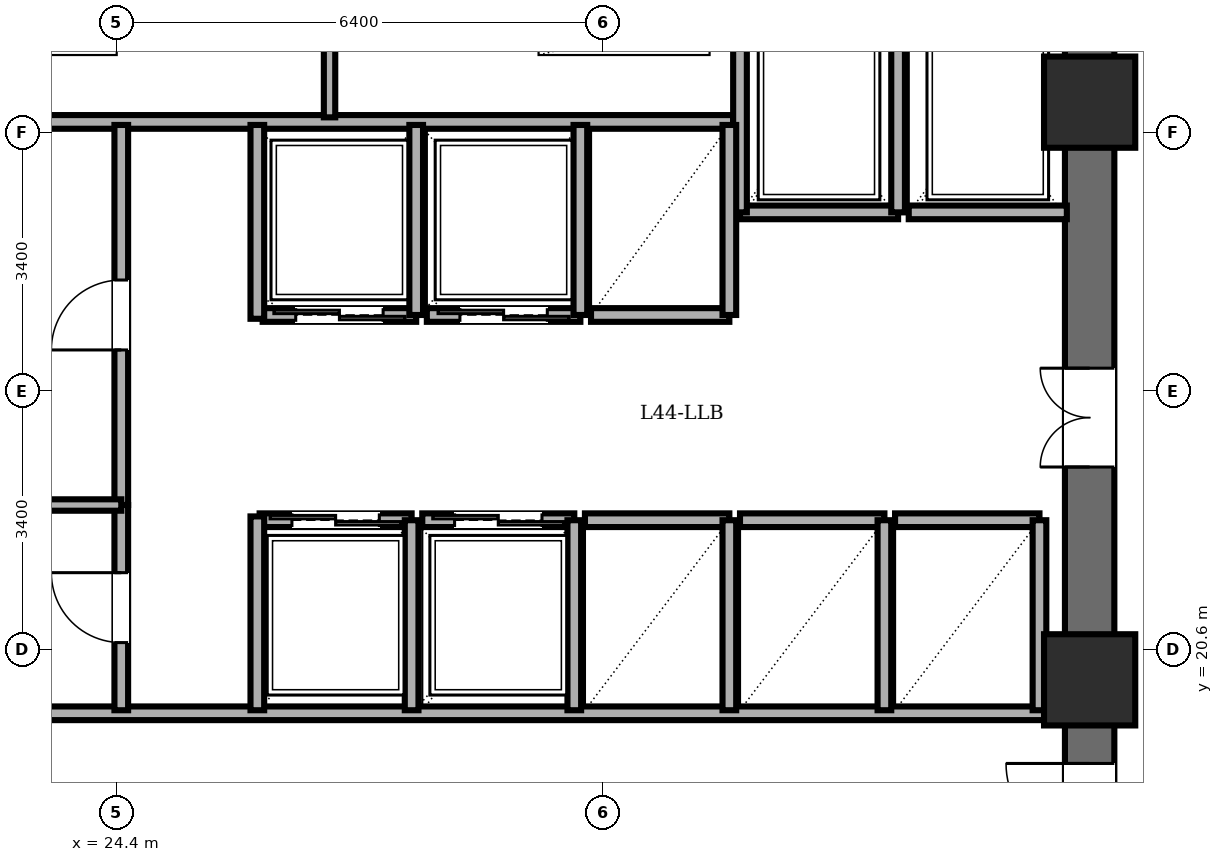
"""IFC4 building model, lengths in metres.
Left out: names, types, materials, properties, quantities, classifications, styles, units other than length and angle.
Written with IfcOpenShell. Run it as: python <this file> out.ifc"""

import sys

from ifc_helpers import new_model, si_unit, direction, frame, frame_2d, origin, origin_2d, place, context, subcontext, project, spatial, rectangle, extrude, element, fill, save


model = new_model("IFC4")
c1 = context("Model", 3, precision=1e-05, world=origin(), true_north=direction((0.0, 1.0)))
c2 = subcontext(c1, "Body", "Model", "MODEL_VIEW")
j1 = project(units=[si_unit("LENGTHUNIT", "METRE"), si_unit("PLANEANGLEUNIT", "RADIAN")], contexts=[c1])
p1 = place(None, origin())
s1 = spatial("IfcSite", under=j1, at=p1, CompositionType="ELEMENT")
p2 = place(p1, origin())
s2 = spatial("IfcBuilding", under=s1, at=p2, CompositionType="ELEMENT")
p3 = place(p2, frame((0.0, 0.0, 169.0)))
s3 = spatial("IfcBuildingStorey", under=s2, at=p3, CompositionType="ELEMENT", Elevation=169.0)
for number, where, z_axis, x_axis in (
    (1, (37.2, 20.2, 0.0), (0.0, 0.0, 1.0), (1.0, 0.0, 0.0)),
    (2, (37.2, 27.8, 0.0), (0.0, 0.0, 1.0), (1.0, 0.0, 0.0)),
):
    element("IfcColumn", number, at=place(p3, frame(where, z_axis=z_axis, x_axis=x_axis)), inside=s3, PredefinedType="COLUMN", context=c2, shape_type="SweptSolid", body=[
        extrude(rectangle(XDim=1.2, YDim=1.2, at=origin_2d()), origin(), (0.0, 0.0, 1.0), 3.6),
    ])
p4 = place(p3, frame((37.2, 14.4, 0.0), z_axis=(0.0, 0.0, 1.0), x_axis=(0.0, 1.0, 0.0)))
e3 = element("IfcWall", 3, at=p4, inside=s3, PredefinedType="SHEAR", context=c2, shape_type="SweptSolid", body=[
    extrude(rectangle(XDim=19.2, YDim=0.65, at=frame_2d((9.6, 0.0))), origin(), (0.0, 0.0, 1.0), 3.4),
])
p5 = place(p4, frame((15.8, 0.0, 0.0)))
e4 = element("IfcOpeningElement", 4, at=p5, cuts=e3, PredefinedType="OPENING", context=c2, shape_type="SweptSolid", body=[
    extrude(rectangle(XDim=1.15, YDim=2.15, at=frame_2d((0.575, 1.075))), frame((0.0, 0.335, 0.0), z_axis=(0.0, -1.0, 0.0), x_axis=(1.0, 0.0, 0.0)), (0.0, 0.0, 1.0), 0.67),
])
p6 = place(p4, frame((3.6, 0.0, 0.0)))
e5 = element("IfcOpeningElement", 5, at=p6, cuts=e3, PredefinedType="OPENING", context=c2, shape_type="SweptSolid", body=[
    extrude(rectangle(XDim=1.1, YDim=2.15, at=frame_2d((0.55, 1.075))), frame((0.0, 0.335, 0.0), z_axis=(0.0, -1.0, 0.0), x_axis=(1.0, 0.0, 0.0)), (0.0, 0.0, 1.0), 0.67),
])
p7 = place(p4, frame((8.6, 0.0, 0.0)))
e6 = element("IfcOpeningElement", 6, at=p7, cuts=e3, PredefinedType="OPENING", context=c2, shape_type="SweptSolid", body=[
    extrude(rectangle(XDim=1.3, YDim=2.2, at=frame_2d((0.65, 1.1))), frame((0.0, 0.335, 0.0), z_axis=(0.0, -1.0, 0.0), x_axis=(1.0, 0.0, 0.0)), (0.0, 0.0, 1.0), 0.67),
])
p8 = place(p3, frame((21.95, 27.54, 0.0), z_axis=(0.0, 0.0, 1.0), x_axis=(1.0, 0.0, 0.0)))
e7 = element("IfcWall", 7, at=p8, inside=s3, PredefinedType="PARTITIONING", context=c2, shape_type="SweptSolid", body=[
    extrude(rectangle(XDim=10.56, YDim=0.18, at=frame_2d((5.28, 0.0))), origin(), (0.0, 0.0, 1.0), 3.4),
])
p9 = place(p3, frame((27.2, 27.6, 0.0), z_axis=(0.0, 0.0, 1.0), x_axis=(0.0, 1.0, 0.0)))
e8 = element("IfcWall", 8, at=p9, inside=s3, PredefinedType="PARTITIONING", context=c2, shape_type="SweptSolid", body=[
    extrude(rectangle(XDim=1.52, YDim=0.15, at=frame_2d((0.76, 0.0))), origin(), (0.0, 0.0, 1.0), 3.4),
])
p10 = place(p3, frame((21.95, 19.76, 0.0), z_axis=(0.0, 0.0, 1.0), x_axis=(1.0, 0.0, 0.0)))
e9 = element("IfcWall", 9, at=p10, inside=s3, PredefinedType="PARTITIONING", context=c2, shape_type="SweptSolid", body=[
    extrude(rectangle(XDim=14.87, YDim=0.18, at=frame_2d((7.435, 0.0))), origin(), (0.0, 0.0, 1.0), 3.4),
])
p11 = place(p3, frame((34.68, 26.35, 0.0), z_axis=(0.0, 0.0, 1.0), x_axis=(-1.0, 0.0, 0.0)))
e10 = element("IfcWall", 10, at=p11, inside=s3, PredefinedType="PARTITIONING", context=c2, shape_type="SweptSolid", body=[
    extrude(rectangle(XDim=2.08, YDim=0.18, at=frame_2d((1.04, 0.0))), origin(), (0.0, 0.0, 1.0), 3.4),
])
for number, where, z_axis, x_axis in (
    (11, (34.68, 26.35, 0.0), (0.0, 0.0, 1.0), (0.0, 1.0, 0.0)),
    (12, (32.6, 29.08, 0.0), (0.0, 0.0, 1.0), (0.0, -1.0, 0.0)),
):
    element("IfcWall", number, at=place(p3, frame(where, z_axis=z_axis, x_axis=x_axis)), inside=s3, PredefinedType="PARTITIONING", context=c2, shape_type="SweptSolid", body=[
        extrude(rectangle(XDim=2.73, YDim=0.18, at=frame_2d((1.365, 0.0))), origin(), (0.0, 0.0, 1.0), 3.4),
    ])
p12 = place(p3, frame((36.9, 26.35, 0.0), z_axis=(0.0, 0.0, 1.0), x_axis=(-1.0, 0.0, 0.0)))
e13 = element("IfcWall", 13, at=p12, inside=s3, PredefinedType="PARTITIONING", context=c2, shape_type="SweptSolid", body=[
    extrude(rectangle(XDim=2.08, YDim=0.18, at=frame_2d((1.04, 0.0))), origin(), (0.0, 0.0, 1.0), 3.4),
])
p13 = place(p3, frame((28.34, 25.0, 0.0), z_axis=(0.0, 0.0, 1.0), x_axis=(-1.0, 0.0, 0.0)))
e14 = element("IfcWall", 14, at=p13, inside=s3, PredefinedType="PARTITIONING", context=c2, shape_type="SweptSolid", body=[
    extrude(rectangle(XDim=2.02, YDim=0.18, at=frame_2d((1.01, 0.0))), origin(), (0.0, 0.0, 1.0), 3.4),
])
p14 = place(p13, frame((0.435, 0.0, 0.0)))
e15 = element("IfcOpeningElement", 15, at=p14, cuts=e14, PredefinedType="OPENING", context=c2, shape_type="SweptSolid", body=[
    extrude(rectangle(XDim=1.15, YDim=2.2, at=frame_2d((0.575, 1.1))), frame((0.0, 0.1, 0.0), z_axis=(0.0, -1.0, 0.0), x_axis=(1.0, 0.0, 0.0)), (0.0, 0.0, 1.0), 0.2),
])
p15 = place(p3, frame((28.34, 25.0, 0.0), z_axis=(0.0, 0.0, 1.0), x_axis=(0.0, 1.0, 0.0)))
e16 = element("IfcWall", 16, at=p15, inside=s3, PredefinedType="PARTITIONING", context=c2, shape_type="SweptSolid", body=[
    extrude(rectangle(XDim=2.5, YDim=0.18, at=frame_2d((1.25, 0.0))), origin(), (0.0, 0.0, 1.0), 3.4),
])
p16 = place(p3, frame((30.5, 25.0, 0.0), z_axis=(0.0, 0.0, 1.0), x_axis=(-1.0, 0.0, 0.0)))
e17 = element("IfcWall", 17, at=p16, inside=s3, PredefinedType="PARTITIONING", context=c2, shape_type="SweptSolid", body=[
    extrude(rectangle(XDim=2.02, YDim=0.18, at=frame_2d((1.01, 0.0))), origin(), (0.0, 0.0, 1.0), 3.4),
])
p17 = place(p16, frame((0.435, 0.0, 0.0)))
e18 = element("IfcOpeningElement", 18, at=p17, cuts=e17, PredefinedType="OPENING", context=c2, shape_type="SweptSolid", body=[
    extrude(rectangle(XDim=1.15, YDim=2.2, at=frame_2d((0.575, 1.1))), frame((0.0, 0.1, 0.0), z_axis=(0.0, -1.0, 0.0), x_axis=(1.0, 0.0, 0.0)), (0.0, 0.0, 1.0), 0.2),
])
p18 = place(p3, frame((30.5, 25.0, 0.0), z_axis=(0.0, 0.0, 1.0), x_axis=(0.0, 1.0, 0.0)))
e19 = element("IfcWall", 19, at=p18, inside=s3, PredefinedType="PARTITIONING", context=c2, shape_type="SweptSolid", body=[
    extrude(rectangle(XDim=2.5, YDim=0.18, at=frame_2d((1.25, 0.0))), origin(), (0.0, 0.0, 1.0), 3.4),
])
p19 = place(p3, frame((26.28, 22.3, 0.0), z_axis=(0.0, 0.0, 1.0), x_axis=(1.0, 0.0, 0.0)))
e20 = element("IfcWall", 20, at=p19, inside=s3, PredefinedType="PARTITIONING", context=c2, shape_type="SweptSolid", body=[
    extrude(rectangle(XDim=2.0, YDim=0.18, at=frame_2d((1.0, 0.0))), origin(), (0.0, 0.0, 1.0), 3.4),
])
p20 = place(p19, frame((0.425, 0.0, 0.0)))
e21 = element("IfcOpeningElement", 21, at=p20, cuts=e20, PredefinedType="OPENING", context=c2, shape_type="SweptSolid", body=[
    extrude(rectangle(XDim=1.15, YDim=2.2, at=frame_2d((0.575, 1.1))), frame((0.0, 0.1, 0.0), z_axis=(0.0, -1.0, 0.0), x_axis=(1.0, 0.0, 0.0)), (0.0, 0.0, 1.0), 0.2),
])
p21 = place(p3, frame((28.28, 19.8, 0.0), z_axis=(0.0, 0.0, 1.0), x_axis=(0.0, 1.0, 0.0)))
e22 = element("IfcWall", 22, at=p21, inside=s3, PredefinedType="PARTITIONING", context=c2, shape_type="SweptSolid", body=[
    extrude(rectangle(XDim=2.5, YDim=0.18, at=frame_2d((1.25, 0.0))), origin(), (0.0, 0.0, 1.0), 3.4),
])
p22 = place(p3, frame((28.42, 22.3, 0.0), z_axis=(0.0, 0.0, 1.0), x_axis=(1.0, 0.0, 0.0)))
e23 = element("IfcWall", 23, at=p22, inside=s3, PredefinedType="PARTITIONING", context=c2, shape_type="SweptSolid", body=[
    extrude(rectangle(XDim=2.0, YDim=0.18, at=frame_2d((1.0, 0.0))), origin(), (0.0, 0.0, 1.0), 3.4),
])
p23 = place(p22, frame((0.425, 0.0, 0.0)))
e24 = element("IfcOpeningElement", 24, at=p23, cuts=e23, PredefinedType="OPENING", context=c2, shape_type="SweptSolid", body=[
    extrude(rectangle(XDim=1.15, YDim=2.2, at=frame_2d((0.575, 1.1))), frame((0.0, 0.1, 0.0), z_axis=(0.0, -1.0, 0.0), x_axis=(1.0, 0.0, 0.0)), (0.0, 0.0, 1.0), 0.2),
])
p24 = place(p3, frame((30.42, 19.8, 0.0), z_axis=(0.0, 0.0, 1.0), x_axis=(0.0, 1.0, 0.0)))
e25 = element("IfcWall", 25, at=p24, inside=s3, PredefinedType="PARTITIONING", context=c2, shape_type="SweptSolid", body=[
    extrude(rectangle(XDim=2.5, YDim=0.18, at=frame_2d((1.25, 0.0))), origin(), (0.0, 0.0, 1.0), 3.4),
])
p25 = place(p3, frame((32.46, 25.0, 0.0), z_axis=(0.0, 0.0, 1.0), x_axis=(-1.0, 0.0, 0.0)))
e26 = element("IfcWall", 26, at=p25, inside=s3, PredefinedType="PARTITIONING", context=c2, shape_type="SweptSolid", body=[
    extrude(rectangle(XDim=1.82, YDim=0.18, at=frame_2d((0.91, 0.0))), origin(), (0.0, 0.0, 1.0), 3.4),
])
p26 = place(p3, frame((32.46, 25.0, 0.0), z_axis=(0.0, 0.0, 1.0), x_axis=(0.0, 1.0, 0.0)))
e27 = element("IfcWall", 27, at=p26, inside=s3, PredefinedType="PARTITIONING", context=c2, shape_type="SweptSolid", body=[
    extrude(rectangle(XDim=2.5, YDim=0.18, at=frame_2d((1.25, 0.0))), origin(), (0.0, 0.0, 1.0), 3.4),
])
p27 = place(p3, frame((30.56, 22.3, 0.0), z_axis=(0.0, 0.0, 1.0), x_axis=(1.0, 0.0, 0.0)))
e28 = element("IfcWall", 28, at=p27, inside=s3, PredefinedType="PARTITIONING", context=c2, shape_type="SweptSolid", body=[
    extrude(rectangle(XDim=1.9, YDim=0.18, at=frame_2d((0.95, 0.0))), origin(), (0.0, 0.0, 1.0), 3.4),
])
p28 = place(p3, frame((32.46, 19.8, 0.0), z_axis=(0.0, 0.0, 1.0), x_axis=(0.0, 1.0, 0.0)))
e29 = element("IfcWall", 29, at=p28, inside=s3, PredefinedType="PARTITIONING", context=c2, shape_type="SweptSolid", body=[
    extrude(rectangle(XDim=2.5, YDim=0.18, at=frame_2d((1.25, 0.0))), origin(), (0.0, 0.0, 1.0), 3.4),
])
p29 = place(p3, frame((32.6, 22.3, 0.0), z_axis=(0.0, 0.0, 1.0), x_axis=(1.0, 0.0, 0.0)))
e30 = element("IfcWall", 30, at=p29, inside=s3, PredefinedType="PARTITIONING", context=c2, shape_type="SweptSolid", body=[
    extrude(rectangle(XDim=1.9, YDim=0.18, at=frame_2d((0.95, 0.0))), origin(), (0.0, 0.0, 1.0), 3.4),
])
p30 = place(p3, frame((34.5, 19.8, 0.0), z_axis=(0.0, 0.0, 1.0), x_axis=(0.0, 1.0, 0.0)))
e31 = element("IfcWall", 31, at=p30, inside=s3, PredefinedType="PARTITIONING", context=c2, shape_type="SweptSolid", body=[
    extrude(rectangle(XDim=2.5, YDim=0.18, at=frame_2d((1.25, 0.0))), origin(), (0.0, 0.0, 1.0), 3.4),
])
p31 = place(p3, frame((34.64, 22.3, 0.0), z_axis=(0.0, 0.0, 1.0), x_axis=(1.0, 0.0, 0.0)))
e32 = element("IfcWall", 32, at=p31, inside=s3, PredefinedType="PARTITIONING", context=c2, shape_type="SweptSolid", body=[
    extrude(rectangle(XDim=1.9, YDim=0.18, at=frame_2d((0.95, 0.0))), origin(), (0.0, 0.0, 1.0), 3.4),
])
p32 = place(p3, frame((36.54, 19.8, 0.0), z_axis=(0.0, 0.0, 1.0), x_axis=(0.0, 1.0, 0.0)))
e33 = element("IfcWall", 33, at=p32, inside=s3, PredefinedType="PARTITIONING", context=c2, shape_type="SweptSolid", body=[
    extrude(rectangle(XDim=2.5, YDim=0.18, at=frame_2d((1.25, 0.0))), origin(), (0.0, 0.0, 1.0), 3.4),
])
p33 = place(p3, frame((24.46, 22.5, 0.0), z_axis=(0.0, 0.0, 1.0), x_axis=(0.0, 1.0, 0.0)))
e34 = element("IfcWall", 34, at=p33, inside=s3, PredefinedType="PARTITIONING", context=c2, shape_type="SweptSolid", body=[
    extrude(rectangle(XDim=5.0, YDim=0.18, at=frame_2d((2.5, 0.0))), origin(), (0.0, 0.0, 1.0), 3.4),
])
p34 = place(p33, frame((2.04, 0.0, 0.0)))
e35 = element("IfcOpeningElement", 35, at=p34, cuts=e34, PredefinedType="OPENING", context=c2, shape_type="SweptSolid", body=[
    extrude(rectangle(XDim=0.92, YDim=2.1, at=frame_2d((0.46, 1.05))), frame((0.0, 0.1, 0.0), z_axis=(0.0, -1.0, 0.0), x_axis=(1.0, 0.0, 0.0)), (0.0, 0.0, 1.0), 0.2),
])
p35 = place(p3, frame((24.46, 19.8, 0.0), z_axis=(0.0, 0.0, 1.0), x_axis=(0.0, 1.0, 0.0)))
e36 = element("IfcWall", 36, at=p35, inside=s3, PredefinedType="PARTITIONING", context=c2, shape_type="SweptSolid", body=[
    extrude(rectangle(XDim=2.7, YDim=0.18, at=frame_2d((1.35, 0.0))), origin(), (0.0, 0.0, 1.0), 3.4),
])
p36 = place(p35, frame((0.89, 0.0, 0.0)))
e37 = element("IfcOpeningElement", 37, at=p36, cuts=e36, PredefinedType="OPENING", context=c2, shape_type="SweptSolid", body=[
    extrude(rectangle(XDim=0.92, YDim=2.1, at=frame_2d((0.46, 1.05))), frame((0.0, 0.1, 0.0), z_axis=(0.0, -1.0, 0.0), x_axis=(1.0, 0.0, 0.0)), (0.0, 0.0, 1.0), 0.2),
])
p37 = place(p3, frame((21.95, 22.5, 0.0), z_axis=(0.0, 0.0, 1.0), x_axis=(1.0, 0.0, 0.0)))
e38 = element("IfcWall", 38, at=p37, inside=s3, PredefinedType="PARTITIONING", context=c2, shape_type="SweptSolid", body=[
    extrude(rectangle(XDim=2.51, YDim=0.15, at=frame_2d((1.255, 0.0))), origin(), (0.0, 0.0, 1.0), 3.4),
])
for number, where, z_axis, x_axis in (
    (39, (26.25, 24.95, 0.0), (0.0, 0.0, 1.0), (0.0, 1.0, 0.0)),
    (40, (26.25, 19.8, 0.0), (0.0, 0.0, 1.0), (0.0, 1.0, 0.0)),
):
    element("IfcWall", number, at=place(p3, frame(where, z_axis=z_axis, x_axis=x_axis)), inside=s3, PredefinedType="PARTITIONING", context=c2, shape_type="SweptSolid", body=[
        extrude(rectangle(XDim=2.55, YDim=0.18, at=frame_2d((1.275, 0.0))), origin(), (0.0, 0.0, 1.0), 3.4),
    ])
p38 = place(p6, origin())
e41 = element("IfcDoor", 41, at=p38, inside=s3, OperationType="SINGLE_SWING_RIGHT", PredefinedType="DOOR", context=c2, shape_type="SweptSolid", body=[
    extrude(rectangle(XDim=1.1, YDim=2.15, at=frame_2d((0.55, 1.075))), frame((0.0, 0.025, 0.0), z_axis=(0.0, -1.0, 0.0), x_axis=(1.0, 0.0, 0.0)), (0.0, 0.0, 1.0), 0.05),
])
fill(e5, e41)
p39 = place(p14, origin())
e42 = element("IfcDoor", 42, at=p39, inside=s3, OperationType="DOUBLE_DOOR_SLIDING", PredefinedType="DOOR", context=c2, shape_type="SweptSolid", body=[
    extrude(rectangle(XDim=1.15, YDim=2.2, at=frame_2d((0.575, 1.1))), frame((0.0, 0.025, 0.0), z_axis=(0.0, -1.0, 0.0), x_axis=(1.0, 0.0, 0.0)), (0.0, 0.0, 1.0), 0.05),
])
fill(e15, e42)
p40 = place(p17, origin())
e43 = element("IfcDoor", 43, at=p40, inside=s3, OperationType="DOUBLE_DOOR_SLIDING", PredefinedType="DOOR", context=c2, shape_type="SweptSolid", body=[
    extrude(rectangle(XDim=1.15, YDim=2.2, at=frame_2d((0.575, 1.1))), frame((0.0, 0.025, 0.0), z_axis=(0.0, -1.0, 0.0), x_axis=(1.0, 0.0, 0.0)), (0.0, 0.0, 1.0), 0.05),
])
fill(e18, e43)
p41 = place(p20, origin())
e44 = element("IfcDoor", 44, at=p41, inside=s3, OperationType="DOUBLE_DOOR_SLIDING", PredefinedType="DOOR", context=c2, shape_type="SweptSolid", body=[
    extrude(rectangle(XDim=1.15, YDim=2.2, at=frame_2d((0.575, 1.1))), frame((0.0, 0.025, 0.0), z_axis=(0.0, -1.0, 0.0), x_axis=(1.0, 0.0, 0.0)), (0.0, 0.0, 1.0), 0.05),
])
fill(e21, e44)
p42 = place(p23, origin())
e45 = element("IfcDoor", 45, at=p42, inside=s3, OperationType="DOUBLE_DOOR_SLIDING", PredefinedType="DOOR", context=c2, shape_type="SweptSolid", body=[
    extrude(rectangle(XDim=1.15, YDim=2.2, at=frame_2d((0.575, 1.1))), frame((0.0, 0.025, 0.0), z_axis=(0.0, -1.0, 0.0), x_axis=(1.0, 0.0, 0.0)), (0.0, 0.0, 1.0), 0.05),
])
fill(e24, e45)
p43 = place(p34, origin())
e46 = element("IfcDoor", 46, at=p43, inside=s3, OperationType="SINGLE_SWING_LEFT", PredefinedType="DOOR", context=c2, shape_type="SweptSolid", body=[
    extrude(rectangle(XDim=0.92, YDim=2.1, at=frame_2d((0.46, 1.05))), frame((0.0, 0.025, 0.0), z_axis=(0.0, -1.0, 0.0), x_axis=(1.0, 0.0, 0.0)), (0.0, 0.0, 1.0), 0.05),
])
fill(e35, e46)
p44 = place(p36, origin())
e47 = element("IfcDoor", 47, at=p44, inside=s3, OperationType="SINGLE_SWING_RIGHT", PredefinedType="DOOR", context=c2, shape_type="SweptSolid", body=[
    extrude(rectangle(XDim=0.92, YDim=2.1, at=frame_2d((0.46, 1.05))), frame((0.0, 0.025, 0.0), z_axis=(0.0, -1.0, 0.0), x_axis=(1.0, 0.0, 0.0)), (0.0, 0.0, 1.0), 0.05),
])
fill(e37, e47)
p45 = place(p7, origin())
e48 = element("IfcDoor", 48, at=p45, inside=s3, OperationType="DOUBLE_DOOR_SINGLE_SWING", PredefinedType="DOOR", context=c2, shape_type="SweptSolid", body=[
    extrude(rectangle(XDim=1.3, YDim=2.2, at=frame_2d((0.65, 1.1))), frame((0.0, 0.025, 0.0), z_axis=(0.0, -1.0, 0.0), x_axis=(1.0, 0.0, 0.0)), (0.0, 0.0, 1.0), 0.05),
])
fill(e6, e48)
save(model, sys.argv[1])
